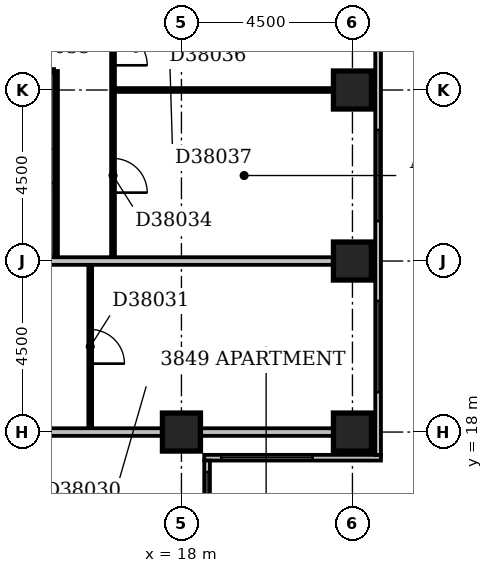
"""IFC4 building model, lengths in metres.
Left out: names, types, materials, properties, quantities, classifications, styles, units other than length and angle.
Written with IfcOpenShell. Run it as: python <this file> out.ifc"""

import sys

from ifc_helpers import new_model, si_unit, direction, frame, frame_2d, origin, origin_2d, place, context, subcontext, project, spatial, rectangle, extrude, element, fill, save


model = new_model("IFC4")
c1 = context("Model", 3, precision=1e-05, world=origin(), true_north=direction((0.0, 1.0)))
c2 = subcontext(c1, "Body", "Model", "MODEL_VIEW")
j1 = project(units=[si_unit("LENGTHUNIT", "METRE"), si_unit("PLANEANGLEUNIT", "RADIAN")], contexts=[c1])
p1 = place(None, origin())
s1 = spatial("IfcSite", under=j1, at=p1, CompositionType="ELEMENT")
p2 = place(p1, origin())
s2 = spatial("IfcBuilding", under=s1, at=p2, CompositionType="ELEMENT")
p3 = place(p2, frame((0.0, 0.0, 152.0)))
s3 = spatial("IfcBuildingStorey", under=s2, at=p3, CompositionType="ELEMENT", Elevation=152.0)
for number, where, z_axis, x_axis in (
    (1, (18.0, 18.0, -0.3), (0.0, 0.0, 1.0), (1.0, 0.0, 0.0)),
    (2, (22.5, 18.0, -0.3), (0.0, 0.0, 1.0), (1.0, 0.0, 0.0)),
    (3, (22.5, 22.5, -0.3), (0.0, 0.0, 1.0), (1.0, 0.0, 0.0)),
    (4, (22.5, 27.0, -0.3), (0.0, 0.0, 1.0), (1.0, 0.0, 0.0)),
):
    element("IfcColumn", number, at=place(p3, frame(where, z_axis=z_axis, x_axis=x_axis)), inside=s3, PredefinedType="COLUMN", context=c2, shape_type="SweptSolid", body=[
        extrude(rectangle(XDim=1.0, YDim=1.0, at=origin_2d()), origin(), (0.0, 0.0, 1.0), 3.6),
    ])
p4 = place(p3, frame((18.675, 8.4, 0.0), z_axis=(0.0, 0.0, 1.0), x_axis=(0.0, 1.0, 0.0)))
e5 = element("IfcWall", 5, at=p4, inside=s3, PredefinedType="STANDARD", context=c2, shape_type="SweptSolid", body=[
    extrude(rectangle(XDim=8.85, YDim=0.15, at=frame_2d((4.425, 0.0))), origin(), (0.0, 0.0, 1.0), 2.7),
])
p5 = place(p4, frame((1.65, 0.0, 0.6)))
e6 = element("IfcOpeningElement", 6, at=p5, cuts=e5, PredefinedType="OPENING", context=c2, shape_type="SweptSolid", body=[
    extrude(rectangle(XDim=2.4, YDim=1.8, at=frame_2d((1.2, 0.9))), frame((0.0, 0.087, 0.0), z_axis=(0.0, -1.0, 0.0), x_axis=(1.0, 0.0, 0.0)), (0.0, 0.0, 1.0), 0.174),
])
p6 = place(p4, frame((6.15, 0.0, 0.6)))
e7 = element("IfcOpeningElement", 7, at=p6, cuts=e5, PredefinedType="OPENING", context=c2, shape_type="SweptSolid", body=[
    extrude(rectangle(XDim=2.4, YDim=1.8, at=frame_2d((1.2, 0.9))), frame((0.0, 0.087, 0.0), z_axis=(0.0, -1.0, 0.0), x_axis=(1.0, 0.0, 0.0)), (0.0, 0.0, 1.0), 0.174),
])
p7 = place(p3, frame((18.6, 17.325, 0.0), z_axis=(0.0, 0.0, 1.0), x_axis=(1.0, 0.0, 0.0)))
e8 = element("IfcWall", 8, at=p7, inside=s3, PredefinedType="STANDARD", context=c2, shape_type="SweptSolid", body=[
    extrude(rectangle(XDim=4.65, YDim=0.15, at=frame_2d((2.325, 0.0))), origin(), (0.0, 0.0, 1.0), 2.7),
])
p8 = place(p7, frame((0.45, 0.0, 0.6)))
e9 = element("IfcOpeningElement", 9, at=p8, cuts=e8, PredefinedType="OPENING", context=c2, shape_type="SweptSolid", body=[
    extrude(rectangle(XDim=2.4, YDim=1.8, at=frame_2d((1.2, 0.9))), frame((0.0, 0.087, 0.0), z_axis=(0.0, -1.0, 0.0), x_axis=(1.0, 0.0, 0.0)), (0.0, 0.0, 1.0), 0.174),
])
p9 = place(p3, frame((23.175, 17.4, 0.0), z_axis=(0.0, 0.0, 1.0), x_axis=(0.0, 1.0, 0.0)))
e10 = element("IfcWall", 10, at=p9, inside=s3, PredefinedType="STANDARD", context=c2, shape_type="SweptSolid", body=[
    extrude(rectangle(XDim=17.85, YDim=0.15, at=frame_2d((8.925, 0.0))), origin(), (0.0, 0.0, 1.0), 2.7),
])
p10 = place(p9, frame((1.65, 0.0, 0.6)))
e11 = element("IfcOpeningElement", 11, at=p10, cuts=e10, PredefinedType="OPENING", context=c2, shape_type="SweptSolid", body=[
    extrude(rectangle(XDim=2.4, YDim=1.8, at=frame_2d((1.2, 0.9))), frame((0.0, 0.087, 0.0), z_axis=(0.0, -1.0, 0.0), x_axis=(1.0, 0.0, 0.0)), (0.0, 0.0, 1.0), 0.174),
])
p11 = place(p9, frame((6.15, 0.0, 0.6)))
e12 = element("IfcOpeningElement", 12, at=p11, cuts=e10, PredefinedType="OPENING", context=c2, shape_type="SweptSolid", body=[
    extrude(rectangle(XDim=2.4, YDim=1.8, at=frame_2d((1.2, 0.9))), frame((0.0, 0.087, 0.0), z_axis=(0.0, -1.0, 0.0), x_axis=(1.0, 0.0, 0.0)), (0.0, 0.0, 1.0), 0.174),
])
p12 = place(p9, frame((11.844, 0.0, 0.6)))
e13 = element("IfcOpeningElement", 13, at=p12, cuts=e10, PredefinedType="OPENING", context=c2, shape_type="SweptSolid", body=[
    extrude(rectangle(XDim=1.5, YDim=1.8, at=frame_2d((0.75, 0.9))), frame((0.0, 0.087, 0.0), z_axis=(0.0, -1.0, 0.0), x_axis=(1.0, 0.0, 0.0)), (0.0, 0.0, 1.0), 0.174),
])
p13 = place(p9, frame((15.15, 0.0, 0.6)))
e14 = element("IfcOpeningElement", 14, at=p13, cuts=e10, PredefinedType="OPENING", context=c2, shape_type="SweptSolid", body=[
    extrude(rectangle(XDim=2.4, YDim=1.8, at=frame_2d((1.2, 0.9))), frame((0.0, 0.087, 0.0), z_axis=(0.0, -1.0, 0.0), x_axis=(1.0, 0.0, 0.0)), (0.0, 0.0, 1.0), 0.174),
])
p14 = place(p3, frame((9.1, 18.0, 0.0), z_axis=(0.0, 0.0, 1.0), x_axis=(1.0, 0.0, 0.0)))
e15 = element("IfcWall", 15, at=p14, inside=s3, PredefinedType="PARTITIONING", context=c2, shape_type="SweptSolid", body=[
    extrude(rectangle(XDim=8.4, YDim=0.2, at=frame_2d((4.2, 0.0))), origin(), (0.0, 0.0, 1.0), 2.6),
])
p15 = place(p3, frame((18.5, 18.0, 0.0), z_axis=(0.0, 0.0, 1.0), x_axis=(1.0, 0.0, 0.0)))
e16 = element("IfcWall", 16, at=p15, inside=s3, PredefinedType="PARTITIONING", context=c2, shape_type="SweptSolid", body=[
    extrude(rectangle(XDim=3.5, YDim=0.2, at=frame_2d((1.75, 0.0))), origin(), (0.0, 0.0, 1.0), 2.7),
])
p16 = place(p3, frame((15.6, 18.1, 0.0), z_axis=(0.0, 0.0, 1.0), x_axis=(0.0, 1.0, 0.0)))
e17 = element("IfcWall", 17, at=p16, inside=s3, PredefinedType="PARTITIONING", context=c2, shape_type="SweptSolid", body=[
    extrude(rectangle(XDim=4.3, YDim=0.1, at=frame_2d((2.15, 0.0))), origin(), (0.0, 0.0, 1.0), 3.3),
])
p17 = place(p16, frame((1.7, 0.0, 0.0)))
e18 = element("IfcOpeningElement", 18, at=p17, cuts=e17, PredefinedType="OPENING", context=c2, shape_type="SweptSolid", body=[
    extrude(rectangle(XDim=0.9, YDim=2.1, at=frame_2d((0.45, 1.05))), frame((0.0, 0.062, 0.0), z_axis=(0.0, -1.0, 0.0), x_axis=(1.0, 0.0, 0.0)), (0.0, 0.0, 1.0), 0.124),
])
p18 = place(p3, frame((9.1, 22.5, 0.0), z_axis=(0.0, 0.0, 1.0), x_axis=(1.0, 0.0, 0.0)))
e19 = element("IfcWall", 19, at=p18, inside=s3, PredefinedType="PARTITIONING", context=c2, shape_type="SweptSolid", body=[
    extrude(rectangle(XDim=12.9, YDim=0.2, at=frame_2d((6.45, 0.0))), origin(), (0.0, 0.0, 1.0), 3.3),
])
p19 = place(p3, frame((14.7, 22.6, 0.0), z_axis=(0.0, 0.0, 1.0), x_axis=(0.0, 1.0, 0.0)))
e20 = element("IfcWall", 20, at=p19, inside=s3, PredefinedType="PARTITIONING", context=c2, shape_type="SweptSolid", body=[
    extrude(rectangle(XDim=4.9, YDim=0.1, at=frame_2d((2.45, 0.0))), origin(), (0.0, 0.0, 1.0), 3.3),
])
p20 = place(p19, frame((1.95, 0.0, 0.0)))
e21 = element("IfcOpeningElement", 21, at=p20, cuts=e20, PredefinedType="OPENING", context=c2, shape_type="SweptSolid", body=[
    extrude(rectangle(XDim=0.9, YDim=2.1, at=frame_2d((0.45, 1.05))), frame((0.0, 0.062, 0.0), z_axis=(0.0, -1.0, 0.0), x_axis=(1.0, 0.0, 0.0)), (0.0, 0.0, 1.0), 0.124),
])
p21 = place(p3, frame((16.2, 22.6, 0.0), z_axis=(0.0, 0.0, 1.0), x_axis=(0.0, 1.0, 0.0)))
e22 = element("IfcWall", 22, at=p21, inside=s3, PredefinedType="PARTITIONING", context=c2, shape_type="SweptSolid", body=[
    extrude(rectangle(XDim=8.8, YDim=0.1, at=frame_2d((4.4, 0.0))), origin(), (0.0, 0.0, 1.0), 3.3),
])
p22 = place(p21, frame((1.7, 0.0, 0.0)))
e23 = element("IfcOpeningElement", 23, at=p22, cuts=e22, PredefinedType="OPENING", context=c2, shape_type="SweptSolid", body=[
    extrude(rectangle(XDim=0.9, YDim=2.1, at=frame_2d((0.45, 1.05))), frame((0.0, 0.062, 0.0), z_axis=(0.0, -1.0, 0.0), x_axis=(1.0, 0.0, 0.0)), (0.0, 0.0, 1.0), 0.124),
])
p23 = place(p21, frame((5.05, 0.0, 0.0)))
e24 = element("IfcOpeningElement", 24, at=p23, cuts=e22, PredefinedType="OPENING", context=c2, shape_type="SweptSolid", body=[
    extrude(rectangle(XDim=0.9, YDim=2.1, at=frame_2d((0.45, 1.05))), frame((0.0, 0.062, 0.0), z_axis=(0.0, -1.0, 0.0), x_axis=(1.0, 0.0, 0.0)), (0.0, 0.0, 1.0), 0.124),
])
p24 = place(p3, frame((16.25, 27.0, 0.0), z_axis=(0.0, 0.0, 1.0), x_axis=(1.0, 0.0, 0.0)))
e25 = element("IfcWall", 25, at=p24, inside=s3, PredefinedType="PARTITIONING", context=c2, shape_type="SweptSolid", body=[
    extrude(rectangle(XDim=5.75, YDim=0.1, at=frame_2d((2.875, 0.0))), origin(), (0.0, 0.0, 1.0), 2.7),
])
p25 = place(p3, frame((9.1, 27.5, 0.0), z_axis=(0.0, 0.0, 1.0), x_axis=(1.0, 0.0, 0.0)))
e26 = element("IfcWall", 26, at=p25, inside=s3, PredefinedType="PARTITIONING", context=c2, shape_type="SweptSolid", body=[
    extrude(rectangle(XDim=5.55, YDim=0.1, at=frame_2d((2.775, 0.0))), origin(), (0.0, 0.0, 1.0), 2.7),
])
p26 = place(p6, origin())
e27 = element("IfcWindow", 27, at=p26, inside=s3, PartitioningType="SINGLE_PANEL", PredefinedType="WINDOW", context=c2, shape_type="SweptSolid", body=[
    extrude(rectangle(XDim=2.4, YDim=1.8, at=frame_2d((1.2, 0.9))), frame((0.0, 0.03, 0.0), z_axis=(0.0, -1.0, 0.0), x_axis=(1.0, 0.0, 0.0)), (0.0, 0.0, 1.0), 0.06),
])
fill(e7, e27)
p27 = place(p8, origin())
e28 = element("IfcWindow", 28, at=p27, inside=s3, PartitioningType="SINGLE_PANEL", PredefinedType="WINDOW", context=c2, shape_type="SweptSolid", body=[
    extrude(rectangle(XDim=2.4, YDim=1.8, at=frame_2d((1.2, 0.9))), frame((0.0, 0.03, 0.0), z_axis=(0.0, -1.0, 0.0), x_axis=(1.0, 0.0, 0.0)), (0.0, 0.0, 1.0), 0.06),
])
fill(e9, e28)
p28 = place(p10, origin())
e29 = element("IfcWindow", 29, at=p28, inside=s3, PartitioningType="SINGLE_PANEL", PredefinedType="WINDOW", context=c2, shape_type="SweptSolid", body=[
    extrude(rectangle(XDim=2.4, YDim=1.8, at=frame_2d((1.2, 0.9))), frame((0.0, 0.03, 0.0), z_axis=(0.0, -1.0, 0.0), x_axis=(1.0, 0.0, 0.0)), (0.0, 0.0, 1.0), 0.06),
])
fill(e11, e29)
p29 = place(p11, origin())
e30 = element("IfcWindow", 30, at=p29, inside=s3, PartitioningType="SINGLE_PANEL", PredefinedType="WINDOW", context=c2, shape_type="SweptSolid", body=[
    extrude(rectangle(XDim=2.4, YDim=1.8, at=frame_2d((1.2, 0.9))), frame((0.0, 0.03, 0.0), z_axis=(0.0, -1.0, 0.0), x_axis=(1.0, 0.0, 0.0)), (0.0, 0.0, 1.0), 0.06),
])
fill(e12, e30)
p30 = place(p17, frame((0.9, 0.0, 0.0), z_axis=(0.0, 0.0, 1.0), x_axis=(-1.0, 0.0, 0.0)))
e31 = element("IfcDoor", 31, at=p30, inside=s3, OperationType="SINGLE_SWING_RIGHT", PredefinedType="DOOR", context=c2, shape_type="SweptSolid", body=[
    extrude(rectangle(XDim=0.9, YDim=2.1, at=frame_2d((0.45, 1.05))), frame((0.0, 0.025, 0.0), z_axis=(0.0, -1.0, 0.0), x_axis=(1.0, 0.0, 0.0)), (0.0, 0.0, 1.0), 0.05),
])
fill(e18, e31)
p31 = place(p20, origin())
e32 = element("IfcDoor", 32, at=p31, inside=s3, OperationType="SINGLE_SWING_LEFT", PredefinedType="DOOR", context=c2, shape_type="SweptSolid", body=[
    extrude(rectangle(XDim=0.9, YDim=2.1, at=frame_2d((0.45, 1.05))), frame((0.0, 0.025, 0.0), z_axis=(0.0, -1.0, 0.0), x_axis=(1.0, 0.0, 0.0)), (0.0, 0.0, 1.0), 0.05),
])
fill(e21, e32)
p32 = place(p22, frame((0.9, 0.0, 0.0), z_axis=(0.0, 0.0, 1.0), x_axis=(-1.0, 0.0, 0.0)))
e33 = element("IfcDoor", 33, at=p32, inside=s3, OperationType="SINGLE_SWING_RIGHT", PredefinedType="DOOR", context=c2, shape_type="SweptSolid", body=[
    extrude(rectangle(XDim=0.9, YDim=2.1, at=frame_2d((0.45, 1.05))), frame((0.0, 0.025, 0.0), z_axis=(0.0, -1.0, 0.0), x_axis=(1.0, 0.0, 0.0)), (0.0, 0.0, 1.0), 0.05),
])
fill(e23, e33)
p33 = place(p23, frame((0.9, 0.0, 0.0), z_axis=(0.0, 0.0, 1.0), x_axis=(-1.0, 0.0, 0.0)))
e34 = element("IfcDoor", 34, at=p33, inside=s3, OperationType="SINGLE_SWING_RIGHT", PredefinedType="DOOR", context=c2, shape_type="SweptSolid", body=[
    extrude(rectangle(XDim=0.9, YDim=2.1, at=frame_2d((0.45, 1.05))), frame((0.0, 0.025, 0.0), z_axis=(0.0, -1.0, 0.0), x_axis=(1.0, 0.0, 0.0)), (0.0, 0.0, 1.0), 0.05),
])
fill(e24, e34)
save(model, sys.argv[1])
